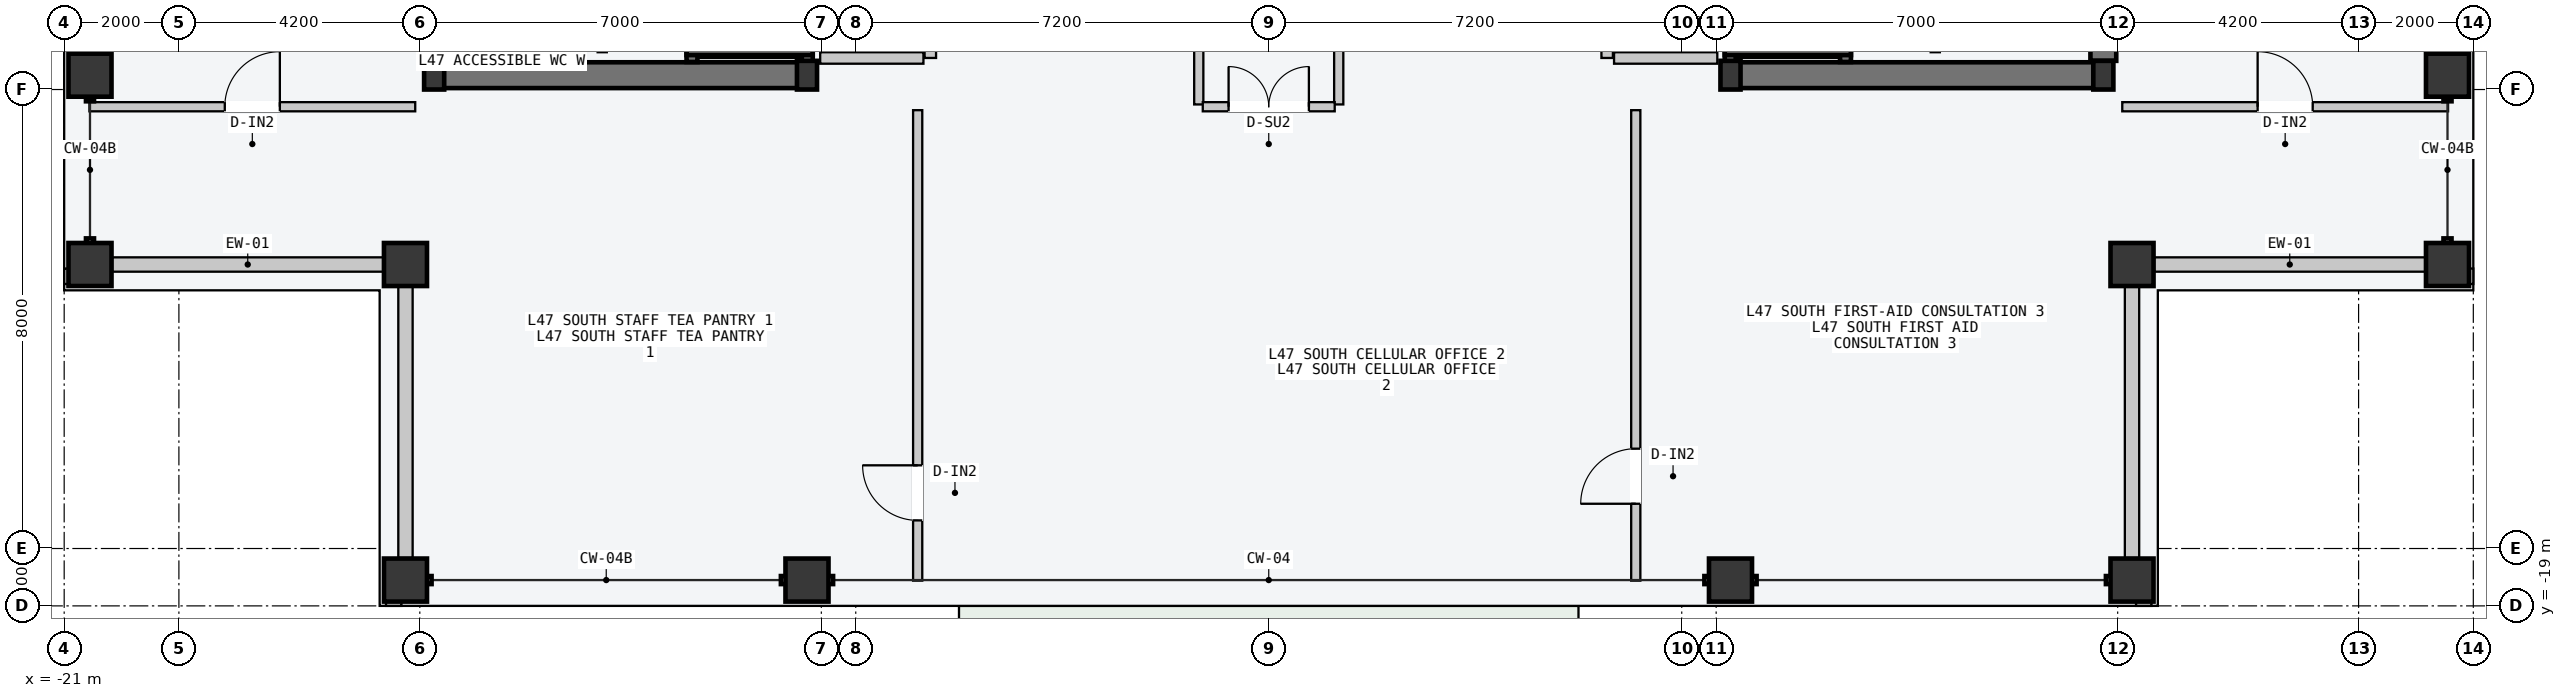
"""IFC4 building model, lengths in metres.
Left out: names, types, materials, properties, quantities, classifications, styles, units other than length and angle.
Written with IfcOpenShell. Run it as: python <this file> out.ifc"""

import sys

from ifc_helpers import new_model, si_unit, direction, frame, frame_2d, origin, origin_2d, place, context, subcontext, project, spatial, rectangle, hollow_rectangle, i_section, extrude, element, fill, save


model = new_model("IFC4")
c1 = context("Model", 3, precision=1e-05, world=origin(), true_north=direction((0.0, 1.0)))
c2 = subcontext(c1, "Body", "Model", "MODEL_VIEW")
j1 = project(units=[si_unit("LENGTHUNIT", "METRE"), si_unit("PLANEANGLEUNIT", "RADIAN")], contexts=[c1])
p1 = place(None, origin())
s1 = spatial("IfcSite", under=j1, at=p1, CompositionType="ELEMENT")
p2 = place(p1, origin())
s2 = spatial("IfcBuilding", under=s1, at=p2, CompositionType="ELEMENT")
p3 = place(p2, frame((0.0, 0.0, 180.3)))
s3 = spatial("IfcBuildingStorey", under=s2, at=p3, CompositionType="ELEMENT", Elevation=180.3)
p4 = place(p3, frame((-14.53, -9.75, -0.2), z_axis=(0.0, 0.0, 1.0), x_axis=(1.0, 0.0, 0.0)))
e1 = element("IfcWall", 1, at=p4, inside=s3, PredefinedType="SHEAR", context=c2, shape_type="SweptSolid", body=[
    extrude(rectangle(XDim=6.46, YDim=0.45, at=frame_2d((3.23, 0.0))), origin(), (0.0, 0.0, 1.0), 3.6),
])
p5 = place(p3, frame((-14.55, -9.5, -0.2), z_axis=(0.0, 0.0, 1.0), x_axis=(0.0, 1.0, 0.0)))
e2 = element("IfcWall", 2, at=p5, inside=s3, PredefinedType="SHEAR", context=c2, shape_type="SweptSolid", body=[
    extrude(rectangle(XDim=9.25, YDim=0.45, at=frame_2d((4.625, 0.0))), origin(), (0.0, 0.0, 1.0), 3.6),
])
p6 = place(p3, frame((8.07, -9.75, -0.2), z_axis=(0.0, 0.0, 1.0), x_axis=(1.0, 0.0, 0.0)))
e3 = element("IfcWall", 3, at=p6, inside=s3, PredefinedType="SHEAR", context=c2, shape_type="SweptSolid", body=[
    extrude(rectangle(XDim=6.46, YDim=0.45, at=frame_2d((3.23, 0.0))), origin(), (0.0, 0.0, 1.0), 3.6),
])
p7 = place(p3, frame((14.55, -9.5, -0.2), z_axis=(0.0, 0.0, 1.0), x_axis=(0.0, 1.0, 0.0)))
e4 = element("IfcWall", 4, at=p7, inside=s3, PredefinedType="SHEAR", context=c2, shape_type="SweptSolid", body=[
    extrude(rectangle(XDim=9.25, YDim=0.45, at=frame_2d((4.625, 0.0))), origin(), (0.0, 0.0, 1.0), 3.6),
])
for number, where, z_axis, x_axis in (
    (5, (-14.55, -9.75, 0.0), (0.0, 0.0, 1.0), (1.0, 0.0, 0.0)),
    (6, (-8.05, -9.75, 0.0), (0.0, 0.0, 1.0), (1.0, 0.0, 0.0)),
    (7, (8.05, -9.75, 0.0), (0.0, 0.0, 1.0), (1.0, 0.0, 0.0)),
    (8, (14.55, -9.75, 0.0), (0.0, 0.0, 1.0), (1.0, 0.0, 0.0)),
):
    element("IfcColumn", number, at=place(p3, frame(where, z_axis=z_axis, x_axis=x_axis)), inside=s3, PredefinedType="COLUMN", context=c2, shape_type="SweptSolid", body=[
        extrude(i_section(OverallWidth=0.35, OverallDepth=0.5, WebThickness=0.02, FlangeThickness=0.032, at=origin_2d()), origin(), (0.0, 0.0, 1.0), 3.6),
    ])
for number, where, z_axis, x_axis in (
    (9, (-15.05, -18.55, 0.0), (0.0, 0.0, 1.0), (1.0, 0.0, 0.0)),
    (10, (-8.05, -18.55, 0.0), (0.0, 0.0, 1.0), (1.0, 0.0, 0.0)),
    (11, (8.05, -18.55, 0.0), (0.0, 0.0, 1.0), (1.0, 0.0, 0.0)),
    (12, (15.05, -18.55, 0.0), (0.0, 0.0, 1.0), (1.0, 0.0, 0.0)),
    (13, (-20.55, -13.05, 0.0), (0.0, 0.0, 1.0), (0.0, 1.0, 0.0)),
    (14, (-20.55, -9.75, 0.0), (0.0, 0.0, 1.0), (0.0, 1.0, 0.0)),
    (15, (20.55, -13.05, 0.0), (0.0, 0.0, 1.0), (0.0, 1.0, 0.0)),
    (16, (20.55, -9.75, 0.0), (0.0, 0.0, 1.0), (0.0, 1.0, 0.0)),
    (17, (15.05, -13.05, 0.0), (0.0, 0.0, 1.0), (1.0, 0.0, 0.0)),
    (18, (-15.05, -13.05, 0.0), (0.0, 0.0, 1.0), (1.0, 0.0, 0.0)),
):
    element("IfcColumn", number, at=place(p3, frame(where, z_axis=z_axis, x_axis=x_axis)), inside=s3, PredefinedType="COLUMN", context=c2, shape_type="SweptSolid", body=[
        extrude(hollow_rectangle(XDim=0.75, YDim=0.75, WallThickness=0.032, at=origin_2d()), origin(), (0.0, 0.0, 1.0), 3.6),
    ])
for number, where, z_axis, x_axis in (
    (19, (-20.165, -13.05, 0.0), (0.0, 0.0, 1.0), (1.0, 0.0, 0.0)),
    (20, (-15.05, -18.165, 0.0), (0.0, 0.0, 1.0), (0.0, 1.0, 0.0)),
    (21, (15.435, -13.05, 0.0), (0.0, 0.0, 1.0), (1.0, 0.0, 0.0)),
    (22, (15.05, -18.165, 0.0), (0.0, 0.0, 1.0), (0.0, 1.0, 0.0)),
):
    element("IfcWall", number, at=place(p3, frame(where, z_axis=z_axis, x_axis=x_axis)), inside=s3, PredefinedType="STANDARD", context=c2, shape_type="SweptSolid", body=[
        extrude(rectangle(XDim=4.73, YDim=0.25, at=frame_2d((2.365, 0.0))), origin(), (0.0, 0.0, 1.0), 2.75),
    ])
for number, where, z_axis, x_axis in (
    (23, (-15.39, -18.89, 0.0), (0.0, 0.0, 1.0), (1.0, 0.0, 0.0)),
    (24, (-20.89, -13.39, 0.0), (0.0, 0.0, 1.0), (0.0, 1.0, 0.0)),
    (25, (15.12, -18.89, 0.0), (0.0, 0.0, 1.0), (1.0, 0.0, 0.0)),
    (26, (20.89, -13.39, 0.0), (0.0, 0.0, 1.0), (0.0, 1.0, 0.0)),
):
    element("IfcWall", number, at=place(p3, frame(where, z_axis=z_axis, x_axis=x_axis)), inside=s3, PredefinedType="PARAPET", context=c2, shape_type="SweptSolid", body=[
        extrude(rectangle(XDim=0.27, YDim=0.22, at=frame_2d((0.135, 0.0))), origin(), (0.0, 0.0, 1.0), 1.2),
    ])
p8 = place(p3, frame((-8.045, -9.52, -0.2), z_axis=(0.0, 0.0, 1.0), x_axis=(0.0, 1.0, 0.0)))
e27 = element("IfcWall", 27, at=p8, inside=s3, PredefinedType="SOLIDWALL", context=c2, shape_type="SweptSolid", body=[
    extrude(rectangle(XDim=2.12, YDim=0.19, at=frame_2d((1.06, 0.0))), origin(), (0.0, 0.0, 1.0), 3.6),
])
p9 = place(p8, frame((0.57, 0.0, 0.2)))
e28 = element("IfcOpeningElement", 28, at=p9, cuts=e27, PredefinedType="OPENING", context=c2, shape_type="SweptSolid", body=[
    extrude(rectangle(XDim=1.1, YDim=2.2, at=frame_2d((0.55, 1.1))), frame((0.0, 0.105, 0.0), z_axis=(0.0, -1.0, 0.0), x_axis=(1.0, 0.0, 0.0)), (0.0, 0.0, 1.0), 0.21),
])
p10 = place(p3, frame((-10.055, -9.52, -0.2), z_axis=(0.0, 0.0, 1.0), x_axis=(0.0, 1.0, 0.0)))
e29 = element("IfcWall", 29, at=p10, inside=s3, PredefinedType="SOLIDWALL", context=c2, shape_type="SweptSolid", body=[
    extrude(rectangle(XDim=2.12, YDim=0.19, at=frame_2d((1.06, 0.0))), origin(), (0.0, 0.0, 1.0), 3.6),
])
p11 = place(p3, frame((-10.15, -9.305, -0.2), z_axis=(0.0, 0.0, 1.0), x_axis=(1.0, 0.0, 0.0)))
e30 = element("IfcWall", 30, at=p11, inside=s3, PredefinedType="SOLIDWALL", context=c2, shape_type="SweptSolid", body=[
    extrude(rectangle(XDim=2.2, YDim=0.19, at=frame_2d((1.1, 0.0))), origin(), (0.0, 0.0, 1.0), 3.6),
])
p12 = place(p3, frame((8.045, -9.52, -0.2), z_axis=(0.0, 0.0, 1.0), x_axis=(0.0, 1.0, 0.0)))
e31 = element("IfcWall", 31, at=p12, inside=s3, PredefinedType="SOLIDWALL", context=c2, shape_type="SweptSolid", body=[
    extrude(rectangle(XDim=2.12, YDim=0.19, at=frame_2d((1.06, 0.0))), origin(), (0.0, 0.0, 1.0), 3.6),
])
p13 = place(p12, frame((0.57, 0.0, 0.2)))
e32 = element("IfcOpeningElement", 32, at=p13, cuts=e31, PredefinedType="OPENING", context=c2, shape_type="SweptSolid", body=[
    extrude(rectangle(XDim=1.1, YDim=2.2, at=frame_2d((0.55, 1.1))), frame((0.0, 0.105, 0.0), z_axis=(0.0, -1.0, 0.0), x_axis=(1.0, 0.0, 0.0)), (0.0, 0.0, 1.0), 0.21),
])
p14 = place(p3, frame((10.055, -9.52, -0.2), z_axis=(0.0, 0.0, 1.0), x_axis=(0.0, 1.0, 0.0)))
e33 = element("IfcWall", 33, at=p14, inside=s3, PredefinedType="SOLIDWALL", context=c2, shape_type="SweptSolid", body=[
    extrude(rectangle(XDim=2.12, YDim=0.19, at=frame_2d((1.06, 0.0))), origin(), (0.0, 0.0, 1.0), 3.6),
])
p15 = place(p3, frame((7.95, -9.305, -0.2), z_axis=(0.0, 0.0, 1.0), x_axis=(1.0, 0.0, 0.0)))
e34 = element("IfcWall", 34, at=p15, inside=s3, PredefinedType="SOLIDWALL", context=c2, shape_type="SweptSolid", body=[
    extrude(rectangle(XDim=2.2, YDim=0.19, at=frame_2d((1.1, 0.0))), origin(), (0.0, 0.0, 1.0), 3.6),
])
p16 = place(p3, frame((-5.9, -9.45, 0.0), z_axis=(0.0, 0.0, 1.0), x_axis=(0.0, 1.0, 0.0)))
e35 = element("IfcWall", 35, at=p16, inside=s3, PredefinedType="PARTITIONING", context=c2, shape_type="SweptSolid", body=[
    extrude(rectangle(XDim=10.5, YDim=0.2, at=frame_2d((5.25, 0.0))), origin(), (0.0, 0.0, 1.0), 3.4),
])
p17 = place(p16, frame((3.9, 0.0, 0.0)))
e36 = element("IfcOpeningElement", 36, at=p17, cuts=e35, PredefinedType="OPENING", context=c2, shape_type="SweptSolid", body=[
    extrude(rectangle(XDim=1.5, YDim=2.2, at=frame_2d((0.75, 1.1))), frame((0.0, 0.11, 0.0), z_axis=(0.0, -1.0, 0.0), x_axis=(1.0, 0.0, 0.0)), (0.0, 0.0, 1.0), 0.22),
])
p18 = place(p3, frame((-6.02, -9.45, 0.0), z_axis=(0.0, 0.0, 1.0), x_axis=(-1.0, 0.0, 0.0)))
e37 = element("IfcWall", 37, at=p18, inside=s3, PredefinedType="PARTITIONING", context=c2, shape_type="SweptSolid", body=[
    extrude(rectangle(XDim=1.8, YDim=0.2, at=frame_2d((0.9, 0.0))), origin(), (0.0, 0.0, 1.0), 3.4),
])
p19 = place(p3, frame((5.9, -9.45, 0.0), z_axis=(0.0, 0.0, 1.0), x_axis=(0.0, 1.0, 0.0)))
e38 = element("IfcWall", 38, at=p19, inside=s3, PredefinedType="PARTITIONING", context=c2, shape_type="SweptSolid", body=[
    extrude(rectangle(XDim=10.5, YDim=0.2, at=frame_2d((5.25, 0.0))), origin(), (0.0, 0.0, 1.0), 3.4),
])
p20 = place(p19, frame((3.9, 0.0, 0.0)))
e39 = element("IfcOpeningElement", 39, at=p20, cuts=e38, PredefinedType="OPENING", context=c2, shape_type="SweptSolid", body=[
    extrude(rectangle(XDim=1.5, YDim=2.2, at=frame_2d((0.75, 1.1))), frame((0.0, 0.11, 0.0), z_axis=(0.0, -1.0, 0.0), x_axis=(1.0, 0.0, 0.0)), (0.0, 0.0, 1.0), 0.22),
])
p21 = place(p3, frame((6.02, -9.45, 0.0), z_axis=(0.0, 0.0, 1.0), x_axis=(1.0, 0.0, 0.0)))
e40 = element("IfcWall", 40, at=p21, inside=s3, PredefinedType="PARTITIONING", context=c2, shape_type="SweptSolid", body=[
    extrude(rectangle(XDim=1.8, YDim=0.2, at=frame_2d((0.9, 0.0))), origin(), (0.0, 0.0, 1.0), 3.4),
])
p22 = place(p3, frame((-1.22, -10.26, 0.0), z_axis=(0.0, 0.0, 1.0), x_axis=(0.0, 1.0, 0.0)))
e41 = element("IfcWall", 41, at=p22, inside=s3, PredefinedType="PARTITIONING", context=c2, shape_type="SweptSolid", body=[
    extrude(rectangle(XDim=4.58, YDim=0.16, at=frame_2d((2.29, 0.0))), origin(), (0.0, 0.0, 1.0), 3.4),
])
p23 = place(p22, frame((1.15, 0.0, 0.0)))
e42 = element("IfcOpeningElement", 42, at=p23, cuts=e41, PredefinedType="OPENING", context=c2, shape_type="SweptSolid", body=[
    extrude(rectangle(XDim=0.96, YDim=2.18, at=frame_2d((0.48, 1.09))), frame((0.0, 0.09, 0.0), z_axis=(0.0, -1.0, 0.0), x_axis=(1.0, 0.0, 0.0)), (0.0, 0.0, 1.0), 0.18),
])
p24 = place(p3, frame((1.22, -10.26, 0.0), z_axis=(0.0, 0.0, 1.0), x_axis=(0.0, 1.0, 0.0)))
e43 = element("IfcWall", 43, at=p24, inside=s3, PredefinedType="PARTITIONING", context=c2, shape_type="SweptSolid", body=[
    extrude(rectangle(XDim=4.58, YDim=0.16, at=frame_2d((2.29, 0.0))), origin(), (0.0, 0.0, 1.0), 3.4),
])
p25 = place(p24, frame((1.15, 0.0, 0.0)))
e44 = element("IfcOpeningElement", 44, at=p25, cuts=e43, PredefinedType="OPENING", context=c2, shape_type="SweptSolid", body=[
    extrude(rectangle(XDim=0.96, YDim=2.18, at=frame_2d((0.48, 1.09))), frame((0.0, 0.09, 0.0), z_axis=(0.0, -1.0, 0.0), x_axis=(1.0, 0.0, 0.0)), (0.0, 0.0, 1.0), 0.18),
])
p26 = place(p3, frame((-6.12, -18.56, 0.0), z_axis=(0.0, 0.0, 1.0), x_axis=(0.0, 1.0, 0.0)))
e45 = element("IfcWall", 45, at=p26, inside=s3, PredefinedType="PARTITIONING", context=c2, shape_type="SweptSolid", body=[
    extrude(rectangle(XDim=8.2, YDim=0.16, at=frame_2d((4.1, 0.0))), origin(), (0.0, 0.0, 1.0), 3.4),
])
p27 = place(p26, frame((1.05, 0.0, 0.0)))
e46 = element("IfcOpeningElement", 46, at=p27, cuts=e45, PredefinedType="OPENING", context=c2, shape_type="SweptSolid", body=[
    extrude(rectangle(XDim=0.96, YDim=2.18, at=frame_2d((0.48, 1.09))), frame((0.0, 0.09, 0.0), z_axis=(0.0, -1.0, 0.0), x_axis=(1.0, 0.0, 0.0)), (0.0, 0.0, 1.0), 0.18),
])
p28 = place(p3, frame((6.399, -18.56, 0.0), z_axis=(0.0, 0.0, 1.0), x_axis=(0.0, 1.0, 0.0)))
e47 = element("IfcWall", 47, at=p28, inside=s3, PredefinedType="PARTITIONING", context=c2, shape_type="SweptSolid", body=[
    extrude(rectangle(XDim=8.2, YDim=0.16, at=frame_2d((4.1, 0.0))), origin(), (0.0, 0.0, 1.0), 3.4),
])
p29 = place(p28, frame((1.34, 0.0, 0.0)))
e48 = element("IfcOpeningElement", 48, at=p29, cuts=e47, PredefinedType="OPENING", context=c2, shape_type="SweptSolid", body=[
    extrude(rectangle(XDim=0.96, YDim=2.18, at=frame_2d((0.48, 1.09))), frame((0.0, 0.09, 0.0), z_axis=(0.0, -1.0, 0.0), x_axis=(1.0, 0.0, 0.0)), (0.0, 0.0, 1.0), 0.18),
])
p30 = place(p3, frame((-1.15, -10.3, 0.0), z_axis=(0.0, 0.0, 1.0), x_axis=(1.0, 0.0, 0.0)))
e49 = element("IfcWall", 49, at=p30, inside=s3, PredefinedType="PARTITIONING", context=c2, shape_type="SweptSolid", body=[
    extrude(rectangle(XDim=2.3, YDim=0.16, at=frame_2d((1.15, 0.0))), origin(), (0.0, 0.0, 1.0), 3.4),
])
p31 = place(p30, frame((0.45, 0.0, 0.0)))
e50 = element("IfcOpeningElement", 50, at=p31, cuts=e49, PredefinedType="OPENING", context=c2, shape_type="SweptSolid", body=[
    extrude(rectangle(XDim=1.4, YDim=2.2, at=frame_2d((0.7, 1.1))), frame((0.0, 0.09, 0.0), z_axis=(0.0, -1.0, 0.0), x_axis=(1.0, 0.0, 0.0)), (0.0, 0.0, 1.0), 0.18),
])
p32 = place(p3, frame((-20.56, -10.3, 0.0), z_axis=(0.0, 0.0, 1.0), x_axis=(1.0, 0.0, 0.0)))
e51 = element("IfcWall", 51, at=p32, inside=s3, PredefinedType="PARTITIONING", context=c2, shape_type="SweptSolid", body=[
    extrude(rectangle(XDim=5.68, YDim=0.16, at=frame_2d((2.84, 0.0))), origin(), (0.0, 0.0, 1.0), 3.4),
])
p33 = place(p32, frame((2.36, 0.0, 0.0)))
e52 = element("IfcOpeningElement", 52, at=p33, cuts=e51, PredefinedType="OPENING", context=c2, shape_type="SweptSolid", body=[
    extrude(rectangle(XDim=0.96, YDim=2.18, at=frame_2d((0.48, 1.09))), frame((0.0, 0.09, 0.0), z_axis=(0.0, -1.0, 0.0), x_axis=(1.0, 0.0, 0.0)), (0.0, 0.0, 1.0), 0.18),
])
p34 = place(p3, frame((14.88, -10.3, 0.0), z_axis=(0.0, 0.0, 1.0), x_axis=(1.0, 0.0, 0.0)))
e53 = element("IfcWall", 53, at=p34, inside=s3, PredefinedType="PARTITIONING", context=c2, shape_type="SweptSolid", body=[
    extrude(rectangle(XDim=5.68, YDim=0.16, at=frame_2d((2.84, 0.0))), origin(), (0.0, 0.0, 1.0), 3.4),
])
p35 = place(p34, frame((2.36, 0.0, 0.0)))
e54 = element("IfcOpeningElement", 54, at=p35, cuts=e53, PredefinedType="OPENING", context=c2, shape_type="SweptSolid", body=[
    extrude(rectangle(XDim=0.96, YDim=2.18, at=frame_2d((0.48, 1.09))), frame((0.0, 0.09, 0.0), z_axis=(0.0, -1.0, 0.0), x_axis=(1.0, 0.0, 0.0)), (0.0, 0.0, 1.0), 0.18),
])
p36 = place(p27, origin())
e55 = element("IfcDoor", 55, at=p36, inside=s3, OperationType="SINGLE_SWING_RIGHT", PredefinedType="DOOR", context=c2, shape_type="SweptSolid", body=[
    extrude(rectangle(XDim=0.96, YDim=2.18, at=frame_2d((0.48, 1.09))), frame((0.0, 0.025, 0.0), z_axis=(0.0, -1.0, 0.0), x_axis=(1.0, 0.0, 0.0)), (0.0, 0.0, 1.0), 0.05),
])
fill(e46, e55)
p37 = place(p29, origin())
e56 = element("IfcDoor", 56, at=p37, inside=s3, OperationType="SINGLE_SWING_LEFT", PredefinedType="DOOR", context=c2, shape_type="SweptSolid", body=[
    extrude(rectangle(XDim=0.96, YDim=2.18, at=frame_2d((0.48, 1.09))), frame((0.0, 0.025, 0.0), z_axis=(0.0, -1.0, 0.0), x_axis=(1.0, 0.0, 0.0)), (0.0, 0.0, 1.0), 0.05),
])
fill(e48, e56)
p38 = place(p31, origin())
e57 = element("IfcDoor", 57, at=p38, inside=s3, OperationType="DOUBLE_DOOR_SINGLE_SWING", PredefinedType="DOOR", context=c2, shape_type="SweptSolid", body=[
    extrude(rectangle(XDim=1.4, YDim=2.2, at=frame_2d((0.7, 1.1))), frame((0.0, 0.025, 0.0), z_axis=(0.0, -1.0, 0.0), x_axis=(1.0, 0.0, 0.0)), (0.0, 0.0, 1.0), 0.05),
])
fill(e50, e57)
p39 = place(p33, origin())
e58 = element("IfcDoor", 58, at=p39, inside=s3, OperationType="SINGLE_SWING_RIGHT", PredefinedType="DOOR", context=c2, shape_type="SweptSolid", body=[
    extrude(rectangle(XDim=0.96, YDim=2.18, at=frame_2d((0.48, 1.09))), frame((0.0, 0.025, 0.0), z_axis=(0.0, -1.0, 0.0), x_axis=(1.0, 0.0, 0.0)), (0.0, 0.0, 1.0), 0.05),
])
fill(e52, e58)
p40 = place(p35, origin())
e59 = element("IfcDoor", 59, at=p40, inside=s3, OperationType="SINGLE_SWING_LEFT", PredefinedType="DOOR", context=c2, shape_type="SweptSolid", body=[
    extrude(rectangle(XDim=0.96, YDim=2.18, at=frame_2d((0.48, 1.09))), frame((0.0, 0.025, 0.0), z_axis=(0.0, -1.0, 0.0), x_axis=(1.0, 0.0, 0.0)), (0.0, 0.0, 1.0), 0.05),
])
fill(e54, e59)
save(model, sys.argv[1])
